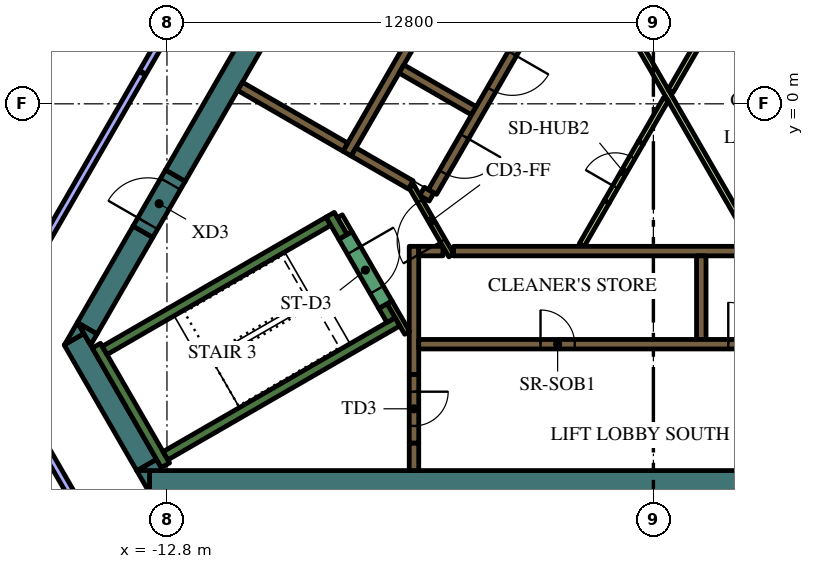
"""IFC4 building model, lengths in metres.
Left out: names, types, materials, properties, quantities, classifications, styles, units other than length and angle.
Written with IfcOpenShell. Run it as: python <this file> out.ifc"""

import sys

from ifc_helpers import new_model, si_unit, direction, frame, frame_2d, origin, place, context, subcontext, project, spatial, polyline, rectangle, outline, extrude, element, fill, save


model = new_model("IFC4")
c1 = context("Model", 3, precision=1e-05, world=origin(), true_north=direction((0.0, 1.0)))
c2 = subcontext(c1, "Body", "Model", "MODEL_VIEW")
j1 = project(units=[si_unit("LENGTHUNIT", "METRE"), si_unit("PLANEANGLEUNIT", "RADIAN")], contexts=[c1])
p1 = place(None, origin())
s1 = spatial("IfcSite", under=j1, at=p1, CompositionType="ELEMENT")
p2 = place(p1, origin())
s2 = spatial("IfcBuilding", under=s1, at=p2, CompositionType="ELEMENT")
p3 = place(p2, frame((0.0, 0.0, 271.2)))
s3 = spatial("IfcBuildingStorey", under=s2, at=p3, CompositionType="ELEMENT", Elevation=271.2)
p4 = place(p3, frame((8.904, -9.95, 0.0), z_axis=(0.0, 0.0, 1.0), x_axis=(-1.0, 0.0, 0.0)))
e1 = element("IfcWall", 1, at=p4, inside=s3, PredefinedType="SOLIDWALL", context=c2, shape_type="SweptSolid", body=[
    extrude(rectangle(XDim=22.161, YDim=0.6, at=frame_2d((11.081, 0.0))), origin(), (0.0, 0.0, 1.0), 4.2),
])
p5 = place(p3, origin())
e2 = element("IfcWall", 2, at=p5, inside=s3, PredefinedType="SOLIDWALL", context=c2, shape_type="SweptSolid", body=[
    extrude(outline(polyline([(-13.597, -9.65), (-13.259, -9.65), (-13.259, -10.236), (-13.597, -9.65)])), origin(), (0.0, 0.0, 1.0), 4.2),
])
p6 = place(p3, frame((-13.333, -9.506, 0.0), z_axis=(0.0, 0.0, 1.0), x_axis=(-0.500019073792, 0.866014391245, 0.0)))
e3 = element("IfcWall", 3, at=p6, inside=s3, PredefinedType="SOLIDWALL", context=c2, shape_type="SweptSolid", body=[
    extrude(rectangle(XDim=3.823, YDim=0.6, at=frame_2d((1.912, 0.0))), origin(), (0.0, 0.0, 1.0), 4.2),
])
e4 = element("IfcWall", 4, at=p5, inside=s3, PredefinedType="SOLIDWALL", context=c2, shape_type="SweptSolid", body=[
    extrude(outline(polyline([(-14.987, -6.043), (-15.493, -6.335), (-15.156, -5.75), (-14.987, -6.043)])), origin(), (0.0, 0.0, 1.0), 4.2),
])
e5 = element("IfcWall", 5, at=p5, inside=s3, PredefinedType="SOLIDWALL", context=c2, shape_type="SweptSolid", body=[
    extrude(outline(polyline([(-12.904, -9.65), (-13.58, -9.65), (-13.073, -9.357), (-12.904, -9.65)])), origin(), (0.0, 0.0, 1.0), 4.2),
])
p7 = place(p3, frame((-13.432, -3.364, 0.0), z_axis=(0.0, 0.0, 1.0), x_axis=(-0.499960127962, -0.866048422692, 0.0)))
e6 = element("IfcWall", 6, at=p7, inside=s3, PredefinedType="SOLIDWALL", context=c2, shape_type="SweptSolid", body=[
    extrude(rectangle(XDim=2.934, YDim=0.6, at=frame_2d((1.467, 0.0))), origin(), (0.0, 0.0, 1.0), 4.2),
])
e7 = element("IfcWall", 7, at=p5, inside=s3, PredefinedType="SOLIDWALL", context=c2, shape_type="SweptSolid", body=[
    extrude(outline(polyline([(-14.809, -6.35), (-15.147, -5.764), (-14.64, -6.057), (-14.809, -6.35)])), origin(), (0.0, 0.0, 1.0), 4.2),
])
p8 = place(p3, frame((-4.234, 12.566, 0.0), z_axis=(0.0, 0.0, 1.0), x_axis=(-0.499998841866, -0.866026072432, 0.0)))
e8 = element("IfcWall", 8, at=p8, inside=s3, PredefinedType="SOLIDWALL", context=c2, shape_type="SweptSolid", body=[
    extrude(rectangle(XDim=16.694, YDim=0.6, at=frame_2d((8.347, 0.0))), origin(), (0.0, 0.0, 1.0), 4.2),
])
p9 = place(p3, frame((-12.84, -9.511, 0.0), z_axis=(0.0, 0.0, 1.0), x_axis=(-0.499997733992, 0.866026712061, 0.0)))
e9 = element("IfcWall", 9, at=p9, inside=s3, PredefinedType="SOLIDWALL", context=c2, shape_type="SweptSolid", body=[
    extrude(rectangle(XDim=3.634, YDim=0.25, at=frame_2d((1.817, 0.0))), origin(), (0.0, 0.0, 1.0), 4.2),
])
p10 = place(p3, frame((-14.44, -6.49, 0.0), z_axis=(0.0, 0.0, 1.0), x_axis=(0.866022966069, 0.500004222222, 0.0)))
e10 = element("IfcWall", 10, at=p10, inside=s3, PredefinedType="SOLIDWALL", context=c2, shape_type="SweptSolid", body=[
    extrude(rectangle(XDim=6.8, YDim=0.25, at=frame_2d((3.4, 0.0))), origin(), (0.0, 0.0, 1.0), 4.2),
])
p11 = place(p3, frame((-8.168, -3.503, 0.0), z_axis=(0.0, 0.0, 1.0), x_axis=(-0.499952099219, 0.866053057547, 0.0)))
e11 = element("IfcWall", 11, at=p11, inside=s3, PredefinedType="SOLIDWALL", context=c2, shape_type="SweptSolid", body=[
    extrude(rectangle(XDim=0.675, YDim=0.25, at=frame_2d((0.337, 0.0))), origin(), (0.0, 0.0, 1.0), 4.2),
])
p12 = place(p3, frame((-12.84, -9.261, 0.0), z_axis=(0.0, 0.0, 1.0), x_axis=(0.866016039709, 0.500016218704, 0.0)))
e12 = element("IfcWall", 12, at=p12, inside=s3, PredefinedType="SOLIDWALL", context=c2, shape_type="SweptSolid", body=[
    extrude(rectangle(XDim=7.05, YDim=0.25, at=frame_2d((3.525, 0.0))), origin(), (0.0, 0.0, 1.0), 4.2),
])
p13 = place(p3, frame((-6.905, -5.69, 0.0), z_axis=(0.0, 0.0, 1.0), x_axis=(-0.500402024738, 0.865793170242, 0.0)))
e13 = element("IfcWall", 13, at=p13, inside=s3, PredefinedType="SOLIDWALL", context=c2, shape_type="SweptSolid", body=[
    extrude(rectangle(XDim=0.425, YDim=0.25, at=frame_2d((0.212, 0.0))), origin(), (0.0, 0.0, 1.0), 4.2),
])
p14 = place(p3, frame((-5.259, -3.875, 0.0), z_axis=(0.0, 0.0, 1.0), x_axis=(1.0, 0.0, 0.0)))
e14 = element("IfcWall", 14, at=p14, inside=s3, PredefinedType="SOLIDWALL", context=c2, shape_type="SweptSolid", body=[
    extrude(rectangle(XDim=10.489, YDim=0.25, at=frame_2d((5.244, 0.0))), origin(), (0.0, 0.0, 1.0), 4.2),
])
p15 = place(p3, frame((1.26, -4.0, 0.0), z_axis=(0.0, 0.0, 1.0), x_axis=(0.0, -1.0, 0.0)))
e15 = element("IfcWall", 15, at=p15, inside=s3, PredefinedType="SOLIDWALL", context=c2, shape_type="SweptSolid", body=[
    extrude(rectangle(XDim=2.2, YDim=0.25, at=frame_2d((1.1, 0.0))), origin(), (0.0, 0.0, 1.0), 4.2),
])
p16 = place(p3, frame((-6.3, -7.125, 0.0), z_axis=(0.0, 0.0, 1.0), x_axis=(0.0, 1.0, 0.0)))
e16 = element("IfcWall", 16, at=p16, inside=s3, PredefinedType="SOLIDWALL", context=c2, shape_type="SweptSolid", body=[
    extrude(rectangle(XDim=3.375, YDim=0.25, at=frame_2d((1.687, 0.0))), origin(), (0.0, 0.0, 1.0), 4.2),
])
p17 = place(p3, frame((-6.175, -3.875, 0.0), z_axis=(0.0, 0.0, 1.0), x_axis=(1.0, 0.0, 0.0)))
e17 = element("IfcWall", 17, at=p17, inside=s3, PredefinedType="SOLIDWALL", context=c2, shape_type="SweptSolid", body=[
    extrude(rectangle(XDim=0.637, YDim=0.25, at=frame_2d((0.318, 0.0))), origin(), (0.0, 0.0, 1.0), 4.2),
])
p18 = place(p3, frame((-6.3, -8.925, 0.0), z_axis=(0.0, 0.0, 1.0), x_axis=(0.0, -1.0, 0.0)))
e18 = element("IfcWall", 18, at=p18, inside=s3, PredefinedType="SOLIDWALL", context=c2, shape_type="SweptSolid", body=[
    extrude(rectangle(XDim=0.725, YDim=0.25, at=frame_2d((0.363, 0.0))), origin(), (0.0, 0.0, 1.0), 4.2),
])
p19 = place(p3, frame((5.97, -2.591, 0.0), z_axis=(0.0, 0.0, 1.0), x_axis=(-0.499994469932, 0.866028596547, 0.0)))
e19 = element("IfcWall", 19, at=p19, inside=s3, PredefinedType="SOLIDWALL", context=c2, shape_type="SweptSolid", body=[
    extrude(rectangle(XDim=10.488, YDim=0.25, at=frame_2d((5.244, 0.0))), origin(), (0.0, 0.0, 1.0), 4.2),
])
p20 = place(p3, frame((-3.02, 7.419, 0.0), z_axis=(0.0, 0.0, 1.0), x_axis=(-0.500022956343, -0.866012149528, 0.0)))
e20 = element("IfcWall", 20, at=p20, inside=s3, PredefinedType="SOLIDWALL", context=c2, shape_type="SweptSolid", body=[
    extrude(rectangle(XDim=10.08, YDim=0.25, at=frame_2d((5.04, 0.0))), origin(), (0.0, 0.0, 1.0), 4.2),
])
p21 = place(p3, frame((-4.724, -0.182, 0.0), z_axis=(0.0, 0.0, 1.0), x_axis=(-0.866008176907, 0.50002983664, 0.0)))
e21 = element("IfcWall", 21, at=p21, inside=s3, PredefinedType="SOLIDWALL", context=c2, shape_type="SweptSolid", body=[
    extrude(rectangle(XDim=2.2, YDim=0.25, at=frame_2d((1.1, 0.0))), origin(), (0.0, 0.0, 1.0), 4.2),
])
p22 = place(p3, frame((-6.088, -2.305, 0.0), z_axis=(0.0, 0.0, 1.0), x_axis=(0.866059450854, -0.499941024108, 0.0)))
e22 = element("IfcWall", 22, at=p22, inside=s3, PredefinedType="SOLIDWALL", context=c2, shape_type="SweptSolid", body=[
    extrude(rectangle(XDim=0.29, YDim=0.25, at=frame_2d((0.145, 0.0))), origin(), (0.0, 0.0, 1.0), 4.2),
])
p23 = place(p3, frame((-7.889, -1.265, 0.0), z_axis=(0.0, 0.0, 1.0), x_axis=(0.865986741702, -0.500066958712, 0.0)))
e23 = element("IfcWall", 23, at=p23, inside=s3, PredefinedType="SOLIDWALL", context=c2, shape_type="SweptSolid", body=[
    extrude(rectangle(XDim=1.738, YDim=0.25, at=frame_2d((0.869, 0.0))), origin(), (0.0, 0.0, 1.0), 4.2),
])
p24 = place(p3, frame((-8.106, -1.14, 0.0), z_axis=(0.0, 0.0, 1.0), x_axis=(-0.866008981251, 0.500028443584, 0.0)))
e24 = element("IfcWall", 24, at=p24, inside=s3, PredefinedType="SOLIDWALL", context=c2, shape_type="SweptSolid", body=[
    extrude(rectangle(XDim=3.2, YDim=0.25, at=frame_2d((1.6, 0.0))), origin(), (0.0, 0.0, 1.0), 4.2),
])
p25 = place(p3, frame((-8.252, -2.958, 0.0), z_axis=(0.0, 0.0, 1.0), x_axis=(0.500174715838, -0.865924508047, 0.0)))
e25 = element("IfcWall", 25, at=p25, inside=s3, PredefinedType="PARTITIONING", context=c2, shape_type="SweptSolid", body=[
    extrude(rectangle(XDim=0.514, YDim=0.15, at=frame_2d((0.257, 0.0))), origin(), (0.0, 0.0, 1.0), 3.55),
])
p26 = place(p3, frame((-6.48, -6.027, 0.0), z_axis=(0.0, 0.0, 1.0), x_axis=(-0.499927229454, 0.866067413802, 0.0)))
e26 = element("IfcWall", 26, at=p26, inside=s3, PredefinedType="PARTITIONING", context=c2, shape_type="SweptSolid", body=[
    extrude(rectangle(XDim=0.929, YDim=0.15, at=frame_2d((0.464, 0.0))), origin(), (0.0, 0.0, 1.0), 4.2),
])
p27 = place(p3, frame((-1.887, 4.168, 0.0), z_axis=(0.0, 0.0, 1.0), x_axis=(0.499997069472, -0.866027095719, 0.0)))
e27 = element("IfcWall", 27, at=p27, inside=s3, PredefinedType="PARTITIONING", context=c2, shape_type="SweptSolid", body=[
    extrude(rectangle(XDim=9.106, YDim=0.15, at=frame_2d((4.553, 0.0))), origin(), (0.0, 0.0, 1.0), 3.55),
])
p28 = place(p3, frame((-0.329, -1.021, 0.0), z_axis=(0.0, 0.0, 1.0), x_axis=(0.500033191285, 0.866006239939, 0.0)))
e28 = element("IfcWall", 28, at=p28, inside=s3, PredefinedType="PARTITIONING", context=c2, shape_type="SweptSolid", body=[
    extrude(rectangle(XDim=1.315, YDim=0.15, at=frame_2d((0.657, 0.0))), origin(), (0.0, 0.0, 1.0), 3.55),
])
p29 = place(p3, frame((2.277, 3.493, 0.0), z_axis=(0.0, 0.0, 1.0), x_axis=(-0.499994550825, -0.866028549844, 0.0)))
e29 = element("IfcWall", 29, at=p29, inside=s3, PredefinedType="PARTITIONING", context=c2, shape_type="SweptSolid", body=[
    extrude(rectangle(XDim=3.65, YDim=0.15, at=frame_2d((1.825, 0.0))), origin(), (0.0, 0.0, 1.0), 3.55),
])
p30 = place(p3, frame((-1.887, -3.718, 0.0), z_axis=(0.0, 0.0, 1.0), x_axis=(0.500033191285, 0.866006239939, 0.0)))
e30 = element("IfcWall", 30, at=p30, inside=s3, PredefinedType="PARTITIONING", context=c2, shape_type="SweptSolid", body=[
    extrude(rectangle(XDim=1.315, YDim=0.15, at=frame_2d((0.657, 0.0))), origin(), (0.0, 0.0, 1.0), 3.55),
])
p31 = place(p3, frame((-6.175, -6.325, 0.0), z_axis=(0.0, 0.0, 1.0), x_axis=(1.0, 0.0, 0.0)))
e31 = element("IfcWall", 31, at=p31, inside=s3, PredefinedType="SOLIDWALL", context=c2, shape_type="SweptSolid", body=[
    extrude(rectangle(XDim=12.35, YDim=0.25, at=frame_2d((6.175, 0.0))), origin(), (0.0, 0.0, 1.0), 4.2),
])
p32 = place(p31, frame((3.205, 0.0, 0.0)))
e32 = element("IfcOpeningElement", 32, at=p32, cuts=e31, PredefinedType="OPENING", context=c2, shape_type="SweptSolid", body=[
    extrude(rectangle(XDim=0.9, YDim=2.1, at=frame_2d((0.45, 1.05))), frame((0.0, 0.135, 0.0), z_axis=(0.0, -1.0, 0.0), x_axis=(1.0, 0.0, 0.0)), (0.0, 0.0, 1.0), 0.27),
])
p33 = place(p31, frame((8.145, 0.0, 0.0)))
e33 = element("IfcOpeningElement", 33, at=p33, cuts=e31, PredefinedType="OPENING", context=c2, shape_type="SweptSolid", body=[
    extrude(rectangle(XDim=1.1, YDim=2.1, at=frame_2d((0.55, 1.05))), frame((0.0, 0.135, 0.0), z_axis=(0.0, -1.0, 0.0), x_axis=(1.0, 0.0, 0.0)), (0.0, 0.0, 1.0), 0.27),
])
p34 = place(p31, frame((10.665, 0.0, 0.0)))
e34 = element("IfcOpeningElement", 34, at=p34, cuts=e31, PredefinedType="OPENING", context=c2, shape_type="SweptSolid", body=[
    extrude(rectangle(XDim=1.1, YDim=2.1, at=frame_2d((0.55, 1.05))), frame((0.0, 0.135, 0.0), z_axis=(0.0, -1.0, 0.0), x_axis=(1.0, 0.0, 0.0)), (0.0, 0.0, 1.0), 0.27),
])
p35 = place(p3, frame((-0.898, 6.194, 0.0), z_axis=(0.0, 0.0, 1.0), x_axis=(-0.499996202215, -0.866027596426, 0.0)))
e35 = element("IfcWall", 35, at=p35, inside=s3, PredefinedType="SOLIDWALL", context=c2, shape_type="SweptSolid", body=[
    extrude(rectangle(XDim=9.83, YDim=0.25, at=frame_2d((4.915, 0.0))), origin(), (0.0, 0.0, 1.0), 4.2),
])
p36 = place(p35, frame((0.585, 0.0, 0.0)))
e36 = element("IfcOpeningElement", 36, at=p36, cuts=e35, PredefinedType="OPENING", context=c2, shape_type="SweptSolid", body=[
    extrude(rectangle(XDim=1.1, YDim=2.1, at=frame_2d((0.55, 1.05))), frame((0.0, 0.135, 0.0), z_axis=(0.0, -1.0, 0.0), x_axis=(1.0, 0.0, 0.0)), (0.0, 0.0, 1.0), 0.27),
])
p37 = place(p35, frame((3.105, 0.0, 0.0)))
e37 = element("IfcOpeningElement", 37, at=p37, cuts=e35, PredefinedType="OPENING", context=c2, shape_type="SweptSolid", body=[
    extrude(rectangle(XDim=1.1, YDim=2.1, at=frame_2d((0.55, 1.05))), frame((0.0, 0.135, 0.0), z_axis=(0.0, -1.0, 0.0), x_axis=(1.0, 0.0, 0.0)), (0.0, 0.0, 1.0), 0.27),
])
p38 = place(p35, frame((5.625, 0.0, 0.0)))
e38 = element("IfcOpeningElement", 38, at=p38, cuts=e35, PredefinedType="OPENING", context=c2, shape_type="SweptSolid", body=[
    extrude(rectangle(XDim=1.1, YDim=2.1, at=frame_2d((0.55, 1.05))), frame((0.0, 0.135, 0.0), z_axis=(0.0, -1.0, 0.0), x_axis=(1.0, 0.0, 0.0)), (0.0, 0.0, 1.0), 0.27),
])
p39 = place(p35, frame((8.145, 0.0, 0.0)))
e39 = element("IfcOpeningElement", 39, at=p39, cuts=e35, PredefinedType="OPENING", context=c2, shape_type="SweptSolid", body=[
    extrude(rectangle(XDim=1.1, YDim=2.1, at=frame_2d((0.55, 1.05))), frame((0.0, 0.135, 0.0), z_axis=(0.0, -1.0, 0.0), x_axis=(1.0, 0.0, 0.0)), (0.0, 0.0, 1.0), 0.27),
])
p40 = place(p3, frame((-8.103, -3.466, 0.0), z_axis=(0.0, 0.0, 1.0), x_axis=(0.500078061341, -0.865980330357, 0.0)))
e40 = element("IfcWall", 40, at=p40, inside=s3, PredefinedType="SOLIDWALL", context=c2, shape_type="SweptSolid", body=[
    extrude(rectangle(XDim=2.1, YDim=0.4, at=frame_2d((1.05, 0.0))), origin(), (0.0, 0.0, 1.0), 4.2),
])
p41 = place(p40, frame((0.45, 0.0, 0.0)))
e41 = element("IfcOpeningElement", 41, at=p41, cuts=e40, PredefinedType="OPENING", context=c2, shape_type="SweptSolid", body=[
    extrude(rectangle(XDim=1.2, YDim=2.1, at=frame_2d((0.6, 1.05))), frame((0.0, 0.21, 0.0), z_axis=(0.0, -1.0, 0.0), x_axis=(1.0, 0.0, 0.0)), (0.0, 0.0, 1.0), 0.42),
])
p42 = place(p3, frame((-6.3, -7.125, 0.0), z_axis=(0.0, 0.0, 1.0), x_axis=(0.0, -1.0, 0.0)))
e42 = element("IfcWall", 42, at=p42, inside=s3, PredefinedType="SOLIDWALL", context=c2, shape_type="SweptSolid", body=[
    extrude(rectangle(XDim=1.8, YDim=0.25, at=frame_2d((0.9, 0.0))), origin(), (0.0, 0.0, 1.0), 4.2),
])
p43 = place(p42, frame((0.45, 0.0, 0.0)))
e43 = element("IfcOpeningElement", 43, at=p43, cuts=e42, PredefinedType="OPENING", context=c2, shape_type="SweptSolid", body=[
    extrude(rectangle(XDim=0.9, YDim=2.1, at=frame_2d((0.45, 1.05))), frame((0.0, 0.135, 0.0), z_axis=(0.0, -1.0, 0.0), x_axis=(1.0, 0.0, 0.0)), (0.0, 0.0, 1.0), 0.27),
])
p44 = place(p3, frame((-5.317, -3.99, 0.0), z_axis=(0.0, 0.0, 1.0), x_axis=(-0.500027713859, 0.866009402589, 0.0)))
e44 = element("IfcWall", 44, at=p44, inside=s3, PredefinedType="PARTITIONING", context=c2, shape_type="SweptSolid", body=[
    extrude(rectangle(XDim=2.1, YDim=0.15, at=frame_2d((1.05, 0.0))), origin(), (0.0, 0.0, 1.0), 4.2),
])
p45 = place(p44, frame((0.45, 0.0, 0.0)))
e45 = element("IfcOpeningElement", 45, at=p45, cuts=e44, PredefinedType="OPENING", context=c2, shape_type="SweptSolid", body=[
    extrude(rectangle(XDim=1.2, YDim=2.1, at=frame_2d((0.6, 1.05))), frame((0.0, 0.085, 0.0), z_axis=(0.0, -1.0, 0.0), x_axis=(1.0, 0.0, 0.0)), (0.0, 0.0, 1.0), 0.17),
])
p46 = place(p3, frame((-13.432, -3.364, 0.0), z_axis=(0.0, 0.0, 1.0), x_axis=(0.500000056704, 0.866025371046, 0.0)))
e46 = element("IfcWall", 46, at=p46, inside=s3, PredefinedType="SOLIDWALL", context=c2, shape_type="SweptSolid", body=[
    extrude(rectangle(XDim=1.7, YDim=0.6, at=frame_2d((0.85, 0.0))), origin(), (0.0, 0.0, 1.0), 4.2),
])
p47 = place(p46, frame((0.25, 0.0, 0.0)))
e47 = element("IfcOpeningElement", 47, at=p47, cuts=e46, PredefinedType="OPENING", context=c2, shape_type="SweptSolid", body=[
    extrude(rectangle(XDim=1.2, YDim=2.1, at=frame_2d((0.6, 1.05))), frame((0.0, 0.31, 0.0), z_axis=(0.0, -1.0, 0.0), x_axis=(1.0, 0.0, 0.0)), (0.0, 0.0, 1.0), 0.62),
])
p48 = place(p3, frame((-1.229, -2.579, 0.0), z_axis=(0.0, 0.0, 1.0), x_axis=(0.500062916607, 0.865989075817, 0.0)))
e48 = element("IfcWall", 48, at=p48, inside=s3, PredefinedType="PARTITIONING", context=c2, shape_type="SweptSolid", body=[
    extrude(rectangle(XDim=1.8, YDim=0.15, at=frame_2d((0.9, 0.0))), origin(), (0.0, 0.0, 1.0), 3.55),
])
p49 = place(p48, frame((0.45, 0.0, 0.0)))
e49 = element("IfcOpeningElement", 49, at=p49, cuts=e48, PredefinedType="OPENING", context=c2, shape_type="SweptSolid", body=[
    extrude(rectangle(XDim=0.9, YDim=2.1, at=frame_2d((0.45, 1.05))), frame((0.0, 0.085, 0.0), z_axis=(0.0, -1.0, 0.0), x_axis=(1.0, 0.0, 0.0)), (0.0, 0.0, 1.0), 0.17),
])
p50 = place(p3, frame((-17.497, -0.613, 0.0), z_axis=(0.0, 0.0, 1.0), x_axis=(0.447474899467, 0.894296491297, 0.0)))
e50 = element("IfcWall", 50, at=p50, inside=s3, PredefinedType="PARTITIONING", context=c2, shape_type="SweptSolid", body=[
    extrude(rectangle(XDim=5.979, YDim=0.15, at=frame_2d((2.99, 0.0))), origin(), (0.0, 0.0, 1.0), 3.55),
])
p51 = place(p50, frame((2.58, 0.0, 0.0)))
e51 = element("IfcOpeningElement", 51, at=p51, cuts=e50, PredefinedType="OPENING", context=c2, shape_type="SweptSolid", body=[
    extrude(rectangle(XDim=0.9, YDim=2.1, at=frame_2d((0.45, 1.05))), frame((0.0, 0.085, 0.0), z_axis=(0.0, -1.0, 0.0), x_axis=(1.0, 0.0, 0.0)), (0.0, 0.0, 1.0), 0.17),
])
p52 = place(p3, frame((-7.436, 11.221, 0.0), z_axis=(0.0, 0.0, 1.0), x_axis=(-0.49999894854, -0.866026010844, 0.0)))
e52 = element("IfcWall", 52, at=p52, inside=s3, PredefinedType="PARTITIONING", context=c2, shape_type="SweptSolid", body=[
    extrude(rectangle(XDim=12.0, YDim=0.2, at=frame_2d((6.0, 0.0))), origin(), (0.0, 0.0, 1.0), 3.55),
])
p53 = place(p52, frame((5.5, 0.0, 0.0)))
e53 = element("IfcOpeningElement", 53, at=p53, cuts=e52, PredefinedType="OPENING", context=c2, shape_type="SweptSolid", body=[
    extrude(rectangle(XDim=1.0, YDim=2.1, at=frame_2d((0.5, 1.05))), frame((0.0, 0.11, 0.0), z_axis=(0.0, -1.0, 0.0), x_axis=(1.0, 0.0, 0.0)), (0.0, 0.0, 1.0), 0.22),
])
p54 = place(p3, frame((-13.451, 0.803, 0.0), z_axis=(0.0, 0.0, 1.0), x_axis=(-0.499982585408, -0.86603545787, 0.0)))
e54 = element("IfcWall", 54, at=p54, inside=s3, PredefinedType="PARTITIONING", context=c2, shape_type="SweptSolid", body=[
    extrude(rectangle(XDim=8.26, YDim=0.2, at=frame_2d((4.13, 0.0))), origin(), (0.0, 0.0, 1.0), 3.55),
])
p55 = place(p3, frame((-17.218, -6.978, 0.0), z_axis=(0.0, 0.0, 1.0), x_axis=(0.500012299885, -0.866018302326, 0.0)))
e55 = element("IfcWall", 55, at=p55, inside=s3, PredefinedType="PARTITIONING", context=c2, shape_type="SweptSolid", body=[
    extrude(rectangle(XDim=5.857, YDim=0.2, at=frame_2d((2.929, 0.0))), origin(), (0.0, 0.0, 1.0), 3.55),
])
p56 = place(p32, origin())
e56 = element("IfcDoor", 56, at=p56, inside=s3, OperationType="SINGLE_SWING_LEFT", PredefinedType="DOOR", context=c2, shape_type="SweptSolid", body=[
    extrude(rectangle(XDim=0.9, YDim=2.1, at=frame_2d((0.45, 1.05))), frame((0.0, 0.025, 0.0), z_axis=(0.0, -1.0, 0.0), x_axis=(1.0, 0.0, 0.0)), (0.0, 0.0, 1.0), 0.05),
])
fill(e32, e56)
p57 = place(p33, origin())
e57 = element("IfcDoor", 57, at=p57, inside=s3, OperationType="DOUBLE_DOOR_SLIDING", PredefinedType="DOOR", context=c2, shape_type="SweptSolid", body=[
    extrude(rectangle(XDim=1.1, YDim=2.1, at=frame_2d((0.55, 1.05))), frame((0.0, 0.025, 0.0), z_axis=(0.0, -1.0, 0.0), x_axis=(1.0, 0.0, 0.0)), (0.0, 0.0, 1.0), 0.05),
])
fill(e33, e57)
p58 = place(p38, origin())
e58 = element("IfcDoor", 58, at=p58, inside=s3, OperationType="DOUBLE_DOOR_SLIDING", PredefinedType="DOOR", context=c2, shape_type="SweptSolid", body=[
    extrude(rectangle(XDim=1.1, YDim=2.1, at=frame_2d((0.55, 1.05))), frame((0.0, 0.025, 0.0), z_axis=(0.0, -1.0, 0.0), x_axis=(1.0, 0.0, 0.0)), (0.0, 0.0, 1.0), 0.05),
])
fill(e38, e58)
p59 = place(p39, origin())
e59 = element("IfcDoor", 59, at=p59, inside=s3, OperationType="DOUBLE_DOOR_SLIDING", PredefinedType="DOOR", context=c2, shape_type="SweptSolid", body=[
    extrude(rectangle(XDim=1.1, YDim=2.1, at=frame_2d((0.55, 1.05))), frame((0.0, 0.025, 0.0), z_axis=(0.0, -1.0, 0.0), x_axis=(1.0, 0.0, 0.0)), (0.0, 0.0, 1.0), 0.05),
])
fill(e39, e59)
p60 = place(p41, origin())
e60 = element("IfcDoor", 60, at=p60, inside=s3, OperationType="SINGLE_SWING_LEFT", PredefinedType="DOOR", context=c2, shape_type="SweptSolid", body=[
    extrude(rectangle(XDim=1.2, YDim=2.1, at=frame_2d((0.6, 1.05))), frame((0.0, 0.025, 0.0), z_axis=(0.0, -1.0, 0.0), x_axis=(1.0, 0.0, 0.0)), (0.0, 0.0, 1.0), 0.05),
])
fill(e41, e60)
p61 = place(p43, origin())
e61 = element("IfcDoor", 61, at=p61, inside=s3, OperationType="SINGLE_SWING_LEFT", PredefinedType="DOOR", context=c2, shape_type="SweptSolid", body=[
    extrude(rectangle(XDim=0.9, YDim=2.1, at=frame_2d((0.45, 1.05))), frame((0.0, 0.025, 0.0), z_axis=(0.0, -1.0, 0.0), x_axis=(1.0, 0.0, 0.0)), (0.0, 0.0, 1.0), 0.05),
])
fill(e43, e61)
p62 = place(p45, origin())
e62 = element("IfcDoor", 62, at=p62, inside=s3, OperationType="SINGLE_SWING_LEFT", PredefinedType="DOOR", context=c2, shape_type="SweptSolid", body=[
    extrude(rectangle(XDim=1.2, YDim=2.1, at=frame_2d((0.6, 1.05))), frame((0.0, 0.025, 0.0), z_axis=(0.0, -1.0, 0.0), x_axis=(1.0, 0.0, 0.0)), (0.0, 0.0, 1.0), 0.05),
])
fill(e45, e62)
p63 = place(p47, origin())
e63 = element("IfcDoor", 63, at=p63, inside=s3, OperationType="SINGLE_SWING_LEFT", PredefinedType="DOOR", context=c2, shape_type="SweptSolid", body=[
    extrude(rectangle(XDim=1.2, YDim=2.1, at=frame_2d((0.6, 1.05))), frame((0.0, 0.025, 0.0), z_axis=(0.0, -1.0, 0.0), x_axis=(1.0, 0.0, 0.0)), (0.0, 0.0, 1.0), 0.05),
])
fill(e47, e63)
p64 = place(p49, origin())
e64 = element("IfcDoor", 64, at=p64, inside=s3, OperationType="SINGLE_SWING_LEFT", PredefinedType="DOOR", context=c2, shape_type="SweptSolid", body=[
    extrude(rectangle(XDim=0.9, YDim=2.1, at=frame_2d((0.45, 1.05))), frame((0.0, 0.025, 0.0), z_axis=(0.0, -1.0, 0.0), x_axis=(1.0, 0.0, 0.0)), (0.0, 0.0, 1.0), 0.05),
])
fill(e49, e64)
save(model, sys.argv[1])
